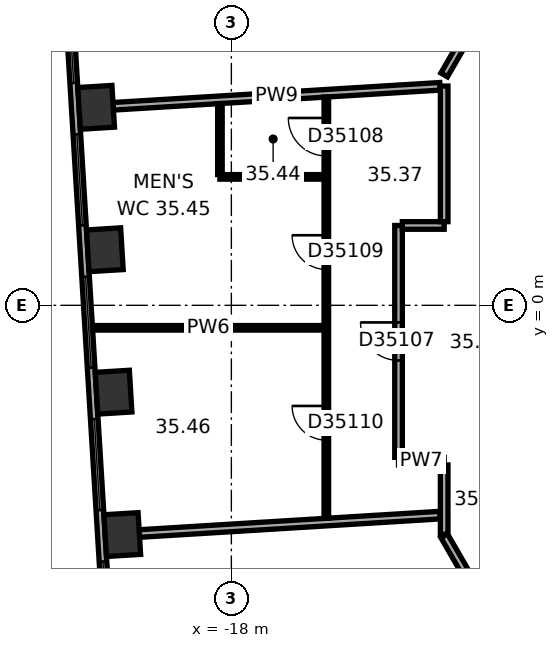
"""IFC4 building model, lengths in metres.
Left out: names, types, materials, properties, quantities, classifications, styles, units other than length and angle.
Written with IfcOpenShell. Run it as: python <this file> out.ifc"""

import sys

from ifc_helpers import new_model, si_unit, direction, frame, frame_2d, origin, origin_2d, place, context, subcontext, project, spatial, rectangle, extrude, element, fill, save


model = new_model("IFC4")
c1 = context("Model", 3, precision=1e-05, world=origin(), true_north=direction((0.0, 1.0)))
c2 = subcontext(c1, "Body", "Model", "MODEL_VIEW")
j1 = project(units=[si_unit("LENGTHUNIT", "METRE"), si_unit("PLANEANGLEUNIT", "RADIAN")], contexts=[c1])
p1 = place(None, origin())
s1 = spatial("IfcSite", under=j1, at=p1, CompositionType="ELEMENT")
p2 = place(p1, origin())
s2 = spatial("IfcBuilding", under=s1, at=p2, CompositionType="ELEMENT")
p3 = place(p2, frame((0.0, 0.0, 146.6)))
s3 = spatial("IfcBuildingStorey", under=s2, at=p3, CompositionType="ELEMENT", Elevation=146.6)
for number, where, z_axis, x_axis in (
    (1, (-21.558, 5.209, 0.0), (0.0, 0.0, 1.0), (0.061, -0.998, 0.0)),
    (2, (-21.329, 1.462, 0.0), (0.0, 0.0, 1.0), (0.061, -0.998, 0.0)),
    (3, (-21.1, -2.285, 0.0), (0.0, 0.0, 1.0), (0.061, -0.998, 0.0)),
    (4, (-20.871, -6.032, 0.0), (0.0, 0.0, 1.0), (0.061, -0.998, 0.0)),
):
    element("IfcColumn", number, at=place(p3, frame(where, z_axis=z_axis, x_axis=x_axis)), inside=s3, PredefinedType="COLUMN", context=c2, shape_type="SweptSolid", body=[
        extrude(rectangle(XDim=1.1, YDim=0.9, at=origin_2d()), origin(), (0.0, 0.0, 1.0), 3.7),
    ])
p4 = place(p3, frame((-22.375, 9.557, 0.0), z_axis=(0.0, 0.0, 1.0), x_axis=(0.061036015339, -0.998135564356, 0.0)))
e5 = element("IfcWall", 5, at=p4, inside=s3, PredefinedType="STANDARD", context=c2, shape_type="SweptSolid", body=[
    extrude(rectangle(XDim=20.044, YDim=0.2, at=frame_2d((10.022, 0.0))), origin(), (0.0, 0.0, 1.0), 3.7),
])
p5 = place(p4, frame((1.313, 0.0, 0.9)))
e6 = element("IfcOpeningElement", 6, at=p5, cuts=e5, PredefinedType="OPENING", context=c2, shape_type="SweptSolid", body=[
    extrude(rectangle(XDim=2.4, YDim=2.0, at=frame_2d((1.2, 1.0))), frame((0.0, 0.11, 0.0), z_axis=(0.0, -1.0, 0.0), x_axis=(1.0, 0.0, 0.0)), (0.0, 0.0, 1.0), 0.22),
])
p6 = place(p4, frame((5.067, 0.0, 0.9)))
e7 = element("IfcOpeningElement", 7, at=p6, cuts=e5, PredefinedType="OPENING", context=c2, shape_type="SweptSolid", body=[
    extrude(rectangle(XDim=2.4, YDim=2.0, at=frame_2d((1.2, 1.0))), frame((0.0, 0.11, 0.0), z_axis=(0.0, -1.0, 0.0), x_axis=(1.0, 0.0, 0.0)), (0.0, 0.0, 1.0), 0.22),
])
p7 = place(p4, frame((8.821, 0.0, 0.9)))
e8 = element("IfcOpeningElement", 8, at=p7, cuts=e5, PredefinedType="OPENING", context=c2, shape_type="SweptSolid", body=[
    extrude(rectangle(XDim=2.4, YDim=2.0, at=frame_2d((1.2, 1.0))), frame((0.0, 0.11, 0.0), z_axis=(0.0, -1.0, 0.0), x_axis=(1.0, 0.0, 0.0)), (0.0, 0.0, 1.0), 0.22),
])
p8 = place(p4, frame((12.575, 0.0, 0.9)))
e9 = element("IfcOpeningElement", 9, at=p8, cuts=e5, PredefinedType="OPENING", context=c2, shape_type="SweptSolid", body=[
    extrude(rectangle(XDim=2.4, YDim=2.0, at=frame_2d((1.2, 1.0))), frame((0.0, 0.11, 0.0), z_axis=(0.0, -1.0, 0.0), x_axis=(1.0, 0.0, 0.0)), (0.0, 0.0, 1.0), 0.22),
])
p9 = place(p4, frame((16.329, 0.0, 0.9)))
e10 = element("IfcOpeningElement", 10, at=p9, cuts=e5, PredefinedType="OPENING", context=c2, shape_type="SweptSolid", body=[
    extrude(rectangle(XDim=2.4, YDim=2.0, at=frame_2d((1.2, 1.0))), frame((0.0, 0.11, 0.0), z_axis=(0.0, -1.0, 0.0), x_axis=(1.0, 0.0, 0.0)), (0.0, 0.0, 1.0), 0.22),
])
p10 = place(p3, frame((-21.654, -0.592, 0.0), z_axis=(0.0, 0.0, 1.0), x_axis=(1.0, 0.0, 0.0)))
e11 = element("IfcWall", 11, at=p10, inside=s3, PredefinedType="PARTITIONING", context=c2, shape_type="SweptSolid", body=[
    extrude(rectangle(XDim=6.093, YDim=0.12, at=frame_2d((3.046, 0.0))), origin(), (0.0, 0.0, 1.0), 3.42),
])
p11 = place(p3, frame((-21.109, 5.237, 0.0), z_axis=(0.0, 0.0, 1.0), x_axis=(0.998135264293, 0.061040922131, 0.0)))
e12 = element("IfcWall", 12, at=p11, inside=s3, PredefinedType="PARTITIONING", context=c2, shape_type="SweptSolid", body=[
    extrude(rectangle(XDim=8.615, YDim=0.2, at=frame_2d((4.308, 0.0))), origin(), (0.0, 0.0, 1.0), 3.42),
])
p12 = place(p3, frame((-20.421, -6.005, 0.0), z_axis=(0.0, 0.0, 1.0), x_axis=(0.998134865741, 0.061047438866, 0.0)))
e13 = element("IfcWall", 13, at=p12, inside=s3, PredefinedType="PARTITIONING", context=c2, shape_type="SweptSolid", body=[
    extrude(rectangle(XDim=7.927, YDim=0.2, at=frame_2d((3.963, 0.0))), origin(), (0.0, 0.0, 1.0), 2.87),
])
p13 = place(p3, frame((-18.301, 3.38, 0.0), z_axis=(0.0, 0.0, 1.0), x_axis=(1.0, 0.0, 0.0)))
e14 = element("IfcWall", 14, at=p13, inside=s3, PredefinedType="PARTITIONING", context=c2, shape_type="SweptSolid", body=[
    extrude(rectangle(XDim=2.74, YDim=0.12, at=frame_2d((1.37, 0.0))), origin(), (0.0, 0.0, 1.0), 3.42),
])
p14 = place(p3, frame((-18.301, 5.308, 0.0), z_axis=(0.0, 0.0, 1.0), x_axis=(0.0, -1.0, 0.0)))
e15 = element("IfcWall", 15, at=p14, inside=s3, PredefinedType="PARTITIONING", context=c2, shape_type="SweptSolid", body=[
    extrude(rectangle(XDim=1.869, YDim=0.12, at=frame_2d((0.934, 0.0))), origin(), (0.0, 0.0, 1.0), 3.42),
])
p15 = place(p3, frame((-15.501, 5.479, 0.0), z_axis=(0.0, 0.0, 1.0), x_axis=(0.0, -1.0, 0.0)))
e16 = element("IfcWall", 16, at=p15, inside=s3, PredefinedType="PARTITIONING", context=c2, shape_type="SweptSolid", body=[
    extrude(rectangle(XDim=11.083, YDim=0.12, at=frame_2d((5.542, 0.0))), origin(), (0.0, 0.0, 1.0), 3.42),
])
p16 = place(p15, frame((0.55, 0.0, 0.0)))
e17 = element("IfcOpeningElement", 17, at=p16, cuts=e16, PredefinedType="OPENING", context=c2, shape_type="SweptSolid", body=[
    extrude(rectangle(XDim=1.0, YDim=2.1, at=frame_2d((0.5, 1.05))), frame((0.0, 0.07, 0.0), z_axis=(0.0, -1.0, 0.0), x_axis=(1.0, 0.0, 0.0)), (0.0, 0.0, 1.0), 0.14),
])
p17 = place(p15, frame((3.636, 0.0, 0.0)))
e18 = element("IfcOpeningElement", 18, at=p17, cuts=e16, PredefinedType="OPENING", context=c2, shape_type="SweptSolid", body=[
    extrude(rectangle(XDim=0.9, YDim=2.1, at=frame_2d((0.45, 1.05))), frame((0.0, 0.07, 0.0), z_axis=(0.0, -1.0, 0.0), x_axis=(1.0, 0.0, 0.0)), (0.0, 0.0, 1.0), 0.14),
])
p18 = place(p15, frame((8.127, 0.0, 0.0)))
e19 = element("IfcOpeningElement", 19, at=p18, cuts=e16, PredefinedType="OPENING", context=c2, shape_type="SweptSolid", body=[
    extrude(rectangle(XDim=0.9, YDim=2.1, at=frame_2d((0.45, 1.05))), frame((0.0, 0.07, 0.0), z_axis=(0.0, -1.0, 0.0), x_axis=(1.0, 0.0, 0.0)), (0.0, 0.0, 1.0), 0.14),
])
p19 = place(p3, frame((-13.601, -4.101, 0.0), z_axis=(0.0, 0.0, 1.0), x_axis=(1.0, 0.0, 0.0)))
e20 = element("IfcWall", 20, at=p19, inside=s3, PredefinedType="PARTITIONING", context=c2, shape_type="SweptSolid", body=[
    extrude(rectangle(XDim=1.201, YDim=0.2, at=frame_2d((0.601, 0.0))), origin(), (0.0, 0.0, 1.0), 3.42),
])
p20 = place(p3, frame((-13.601, 2.101, 0.0), z_axis=(0.0, 0.0, 1.0), x_axis=(0.0, -1.0, 0.0)))
e21 = element("IfcWall", 21, at=p20, inside=s3, PredefinedType="PARTITIONING", context=c2, shape_type="SweptSolid", body=[
    extrude(rectangle(XDim=6.102, YDim=0.2, at=frame_2d((3.051, 0.0))), origin(), (0.0, 0.0, 1.0), 3.42),
])
p21 = place(p20, frame((2.551, 0.0, 0.0)))
e22 = element("IfcOpeningElement", 22, at=p21, cuts=e21, PredefinedType="OPENING", context=c2, shape_type="SweptSolid", body=[
    extrude(rectangle(XDim=1.0, YDim=2.1, at=frame_2d((0.5, 1.05))), frame((0.0, 0.11, 0.0), z_axis=(0.0, -1.0, 0.0), x_axis=(1.0, 0.0, 0.0)), (0.0, 0.0, 1.0), 0.22),
])
p22 = place(p3, frame((-12.4, -6.062, 0.0), z_axis=(0.0, 0.0, 1.0), x_axis=(0.500022797313, -0.86601224135, 0.0)))
e23 = element("IfcWall", 23, at=p22, inside=s3, PredefinedType="PARTITIONING", context=c2, shape_type="SweptSolid", body=[
    extrude(rectangle(XDim=1.9, YDim=0.2, at=frame_2d((0.95, 0.0))), origin(), (0.0, 0.0, 1.0), 3.42),
])
p23 = place(p3, frame((-12.4, -4.201, 0.0), z_axis=(0.0, 0.0, 1.0), x_axis=(0.0, -1.0, 0.0)))
e24 = element("IfcWall", 24, at=p23, inside=s3, PredefinedType="PARTITIONING", context=c2, shape_type="SweptSolid", body=[
    extrude(rectangle(XDim=1.821, YDim=0.2, at=frame_2d((0.911, 0.0))), origin(), (0.0, 0.0, 1.0), 3.42),
])
p24 = place(p3, frame((-12.4, 2.101, 0.0), z_axis=(0.0, 0.0, 1.0), x_axis=(-1.0, 0.0, 0.0)))
e25 = element("IfcWall", 25, at=p24, inside=s3, PredefinedType="PARTITIONING", context=c2, shape_type="SweptSolid", body=[
    extrude(rectangle(XDim=1.101, YDim=0.2, at=frame_2d((0.551, 0.0))), origin(), (0.0, 0.0, 1.0), 3.42),
])
p25 = place(p3, frame((-12.4, 5.769, 0.0), z_axis=(0.0, 0.0, 1.0), x_axis=(0.0, -1.0, 0.0)))
e26 = element("IfcWall", 26, at=p25, inside=s3, PredefinedType="PARTITIONING", context=c2, shape_type="SweptSolid", body=[
    extrude(rectangle(XDim=3.568, YDim=0.2, at=frame_2d((1.784, 0.0))), origin(), (0.0, 0.0, 1.0), 3.42),
])
p26 = place(p3, frame((-11.45, 7.708, 0.0), z_axis=(0.0, 0.0, 1.0), x_axis=(-0.500022797313, -0.86601224135, 0.0)))
e27 = element("IfcWall", 27, at=p26, inside=s3, PredefinedType="PARTITIONING", context=c2, shape_type="SweptSolid", body=[
    extrude(rectangle(XDim=1.9, YDim=0.2, at=frame_2d((0.95, 0.0))), origin(), (0.0, 0.0, 1.0), 3.42),
])
p27 = place(p5, origin())
e28 = element("IfcWindow", 28, at=p27, inside=s3, PartitioningType="SINGLE_PANEL", PredefinedType="WINDOW", context=c2, shape_type="SweptSolid", body=[
    extrude(rectangle(XDim=2.4, YDim=2.0, at=frame_2d((1.2, 1.0))), frame((0.0, 0.03, 0.0), z_axis=(0.0, -1.0, 0.0), x_axis=(1.0, 0.0, 0.0)), (0.0, 0.0, 1.0), 0.06),
])
fill(e6, e28)
p28 = place(p6, origin())
e29 = element("IfcWindow", 29, at=p28, inside=s3, PartitioningType="SINGLE_PANEL", PredefinedType="WINDOW", context=c2, shape_type="SweptSolid", body=[
    extrude(rectangle(XDim=2.4, YDim=2.0, at=frame_2d((1.2, 1.0))), frame((0.0, 0.03, 0.0), z_axis=(0.0, -1.0, 0.0), x_axis=(1.0, 0.0, 0.0)), (0.0, 0.0, 1.0), 0.06),
])
fill(e7, e29)
p29 = place(p7, origin())
e30 = element("IfcWindow", 30, at=p29, inside=s3, PartitioningType="SINGLE_PANEL", PredefinedType="WINDOW", context=c2, shape_type="SweptSolid", body=[
    extrude(rectangle(XDim=2.4, YDim=2.0, at=frame_2d((1.2, 1.0))), frame((0.0, 0.03, 0.0), z_axis=(0.0, -1.0, 0.0), x_axis=(1.0, 0.0, 0.0)), (0.0, 0.0, 1.0), 0.06),
])
fill(e8, e30)
p30 = place(p8, origin())
e31 = element("IfcWindow", 31, at=p30, inside=s3, PartitioningType="SINGLE_PANEL", PredefinedType="WINDOW", context=c2, shape_type="SweptSolid", body=[
    extrude(rectangle(XDim=2.4, YDim=2.0, at=frame_2d((1.2, 1.0))), frame((0.0, 0.03, 0.0), z_axis=(0.0, -1.0, 0.0), x_axis=(1.0, 0.0, 0.0)), (0.0, 0.0, 1.0), 0.06),
])
fill(e9, e31)
p31 = place(p9, origin())
e32 = element("IfcWindow", 32, at=p31, inside=s3, PartitioningType="SINGLE_PANEL", PredefinedType="WINDOW", context=c2, shape_type="SweptSolid", body=[
    extrude(rectangle(XDim=2.4, YDim=2.0, at=frame_2d((1.2, 1.0))), frame((0.0, 0.03, 0.0), z_axis=(0.0, -1.0, 0.0), x_axis=(1.0, 0.0, 0.0)), (0.0, 0.0, 1.0), 0.06),
])
fill(e10, e32)
p32 = place(p21, origin())
e33 = element("IfcDoor", 33, at=p32, inside=s3, OperationType="SINGLE_SWING_LEFT", PredefinedType="DOOR", context=c2, shape_type="SweptSolid", body=[
    extrude(rectangle(XDim=1.0, YDim=2.1, at=frame_2d((0.5, 1.05))), frame((0.0, 0.025, 0.0), z_axis=(0.0, -1.0, 0.0), x_axis=(1.0, 0.0, 0.0)), (0.0, 0.0, 1.0), 0.05),
])
fill(e22, e33)
p33 = place(p16, origin())
e34 = element("IfcDoor", 34, at=p33, inside=s3, OperationType="SINGLE_SWING_LEFT", PredefinedType="DOOR", context=c2, shape_type="SweptSolid", body=[
    extrude(rectangle(XDim=1.0, YDim=2.1, at=frame_2d((0.5, 1.05))), frame((0.0, 0.025, 0.0), z_axis=(0.0, -1.0, 0.0), x_axis=(1.0, 0.0, 0.0)), (0.0, 0.0, 1.0), 0.05),
])
fill(e17, e34)
p34 = place(p17, origin())
e35 = element("IfcDoor", 35, at=p34, inside=s3, OperationType="SINGLE_SWING_LEFT", PredefinedType="DOOR", context=c2, shape_type="SweptSolid", body=[
    extrude(rectangle(XDim=0.9, YDim=2.1, at=frame_2d((0.45, 1.05))), frame((0.0, 0.025, 0.0), z_axis=(0.0, -1.0, 0.0), x_axis=(1.0, 0.0, 0.0)), (0.0, 0.0, 1.0), 0.05),
])
fill(e18, e35)
p35 = place(p18, origin())
e36 = element("IfcDoor", 36, at=p35, inside=s3, OperationType="SINGLE_SWING_LEFT", PredefinedType="DOOR", context=c2, shape_type="SweptSolid", body=[
    extrude(rectangle(XDim=0.9, YDim=2.1, at=frame_2d((0.45, 1.05))), frame((0.0, 0.025, 0.0), z_axis=(0.0, -1.0, 0.0), x_axis=(1.0, 0.0, 0.0)), (0.0, 0.0, 1.0), 0.05),
])
fill(e19, e36)
save(model, sys.argv[1])
